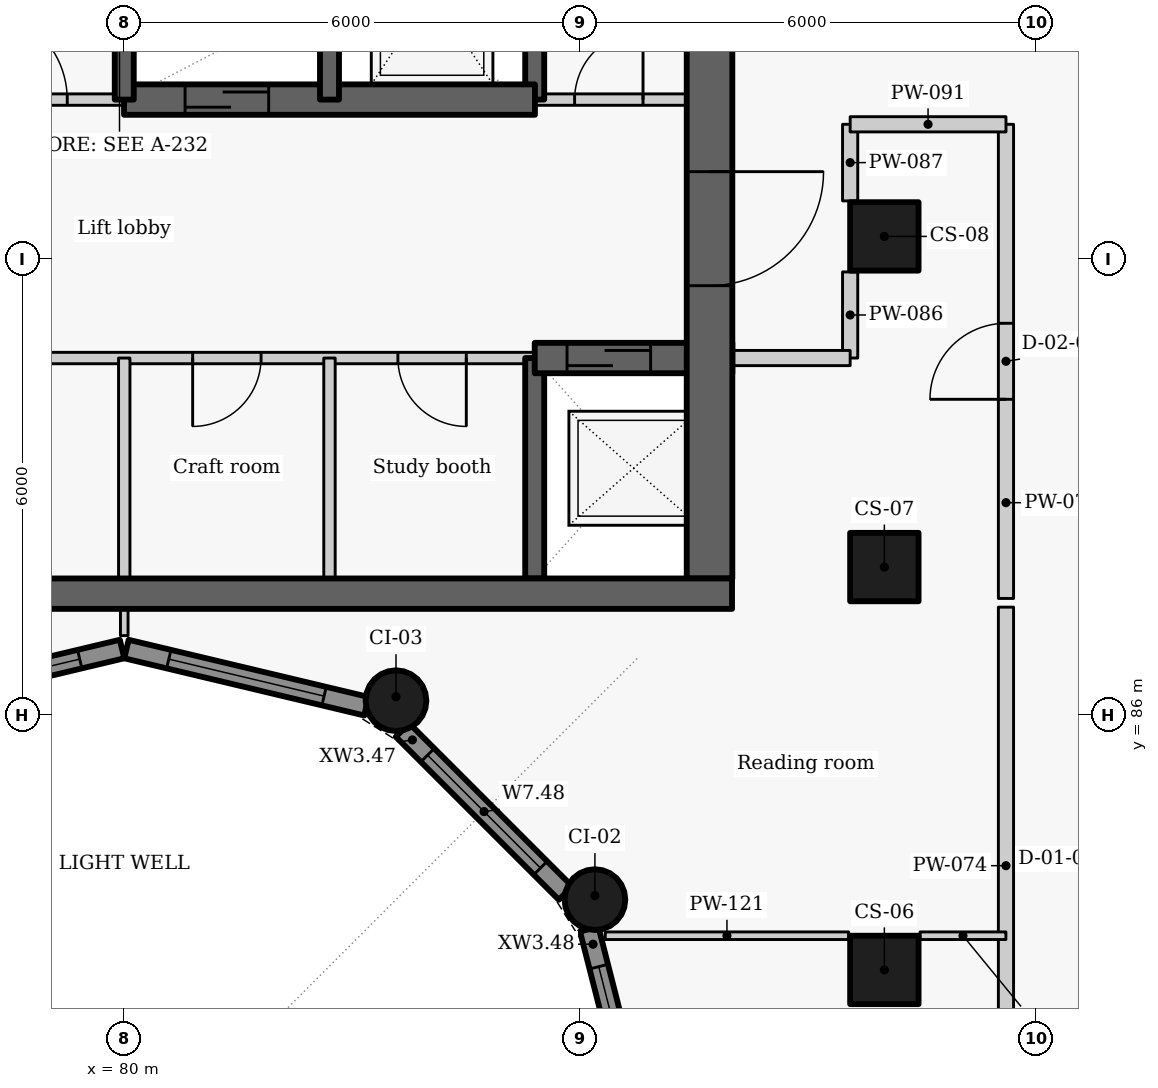
"""IFC4 building model, lengths in metres.
Left out: names, types, materials, properties, quantities, classifications, styles, units other than length and angle.
Written with IfcOpenShell. Run it as: python <this file> out.ifc"""

import sys

from ifc_helpers import new_model, si_unit, direction, frame, frame_2d, origin, origin_2d, place, context, subcontext, project, spatial, rectangle, circle, extrude, element, fill, save


model = new_model("IFC4")
c1 = context("Model", 3, precision=1e-05, world=origin(), true_north=direction((0.0, 1.0)))
c2 = subcontext(c1, "Body", "Model", "MODEL_VIEW")
j1 = project(units=[si_unit("LENGTHUNIT", "METRE"), si_unit("PLANEANGLEUNIT", "RADIAN")], contexts=[c1])
p1 = place(None, origin())
s1 = spatial("IfcSite", under=j1, at=p1, CompositionType="ELEMENT")
p2 = place(p1, origin())
s2 = spatial("IfcBuilding", under=s1, at=p2, CompositionType="ELEMENT")
p3 = place(p2, frame((0.0, 0.0, 180.0)))
s3 = spatial("IfcBuildingStorey", under=s2, at=p3, CompositionType="ELEMENT", Elevation=180.0)
for number, where, z_axis, x_axis in (
    (1, (90.0, 82.65, 0.0), (0.0, 0.0, 1.0), (0.0, 1.0, 0.0)),
    (2, (90.0, 87.95, 0.0), (0.0, 0.0, 1.0), (0.0, 1.0, 0.0)),
    (3, (90.0, 92.3, 0.0), (0.0, 0.0, 1.0), (0.0, 1.0, 0.0)),
):
    element("IfcColumn", number, at=place(p3, frame(where, z_axis=z_axis, x_axis=x_axis)), inside=s3, PredefinedType="COLUMN", context=c2, shape_type="SweptSolid", body=[
        extrude(rectangle(XDim=0.9, YDim=0.9, at=origin_2d()), origin(), (0.0, 0.0, 1.0), 3.3),
    ])
for number, where, z_axis, x_axis in (
    (4, (86.192, 83.575, 0.0), (0.0, 0.0, 1.0), (-0.5, 0.866, 0.0)),
    (5, (83.575, 86.192, 0.0), (0.0, 0.0, 1.0), (-0.866, 0.5, 0.0)),
):
    element("IfcColumn", number, at=place(p3, frame(where, z_axis=z_axis, x_axis=x_axis)), inside=s3, PredefinedType="COLUMN", context=c2, shape_type="SweptSolid", body=[
        extrude(circle(Radius=0.4, at=origin_2d()), origin(), (0.0, 0.0, 1.0), 3.3),
    ])
p4 = place(p3, frame((76.814, 86.119, 0.0), z_axis=(0.0, 0.0, 1.0), x_axis=(0.972773113459, 0.231759508395, 0.0)))
e6 = element("IfcWall", 6, at=p4, inside=s3, PredefinedType="SOLIDWALL", context=c2, shape_type="SweptSolid", body=[
    extrude(rectangle(XDim=3.246, YDim=0.25, at=frame_2d((1.623, 0.0))), origin(), (0.0, 0.0, 1.0), 2.425),
])
p5 = place(p4, frame((0.573, 0.0, 0.9)))
e7 = element("IfcOpeningElement", 7, at=p5, cuts=e6, PredefinedType="OPENING", context=c2, shape_type="SweptSolid", body=[
    extrude(rectangle(XDim=2.1, YDim=1.1, at=frame_2d((1.05, 0.55))), frame((0.0, 0.135, 0.0), z_axis=(0.0, -1.0, 0.0), x_axis=(1.0, 0.0, 0.0)), (0.0, 0.0, 1.0), 0.27),
])
p6 = place(p3, frame((80.029, 86.872, 0.0), z_axis=(0.0, 0.0, 1.0), x_axis=(0.972773113459, -0.231759508395, 0.0)))
e8 = element("IfcWall", 8, at=p6, inside=s3, PredefinedType="SOLIDWALL", context=c2, shape_type="SweptSolid", body=[
    extrude(rectangle(XDim=3.246, YDim=0.25, at=frame_2d((1.623, 0.0))), origin(), (0.0, 0.0, 1.0), 2.425),
])
p7 = place(p6, frame((0.573, 0.0, 0.9)))
e9 = element("IfcOpeningElement", 9, at=p7, cuts=e8, PredefinedType="OPENING", context=c2, shape_type="SweptSolid", body=[
    extrude(rectangle(XDim=2.1, YDim=1.1, at=frame_2d((1.05, 0.55))), frame((0.0, 0.135, 0.0), z_axis=(0.0, -1.0, 0.0), x_axis=(1.0, 0.0, 0.0)), (0.0, 0.0, 1.0), 0.27),
])
p8 = place(p3, frame((83.661, 85.806, 0.0), z_axis=(0.0, 0.0, 1.0), x_axis=(0.707106781187, -0.707106781187, 0.0)))
e10 = element("IfcWall", 10, at=p8, inside=s3, PredefinedType="SOLIDWALL", context=c2, shape_type="SweptSolid", body=[
    extrude(rectangle(XDim=3.033, YDim=0.25, at=frame_2d((1.517, 0.0))), origin(), (0.0, 0.0, 1.0), 2.425),
])
p9 = place(p8, frame((0.467, 0.0, 0.9)))
e11 = element("IfcOpeningElement", 11, at=p9, cuts=e10, PredefinedType="OPENING", context=c2, shape_type="SweptSolid", body=[
    extrude(rectangle(XDim=2.1, YDim=1.1, at=frame_2d((1.05, 0.55))), frame((0.0, 0.135, 0.0), z_axis=(0.0, -1.0, 0.0), x_axis=(1.0, 0.0, 0.0)), (0.0, 0.0, 1.0), 0.27),
])
p10 = place(p3, frame((86.117, 83.187, 0.0), z_axis=(0.0, 0.0, 1.0), x_axis=(0.247055971283, -0.969001211069, 0.0)))
e12 = element("IfcWall", 12, at=p10, inside=s3, PredefinedType="SOLIDWALL", context=c2, shape_type="SweptSolid", body=[
    extrude(rectangle(XDim=3.01, YDim=0.25, at=frame_2d((1.505, 0.0))), origin(), (0.0, 0.0, 1.0), 2.425),
])
p11 = place(p10, frame((0.51, 0.0, 0.9)))
e13 = element("IfcOpeningElement", 13, at=p11, cuts=e12, PredefinedType="OPENING", context=c2, shape_type="SweptSolid", body=[
    extrude(rectangle(XDim=2.1, YDim=1.1, at=frame_2d((1.05, 0.55))), frame((0.0, 0.135, 0.0), z_axis=(0.0, -1.0, 0.0), x_axis=(1.0, 0.0, 0.0)), (0.0, 0.0, 1.0), 0.27),
])
p12 = place(p3, frame((85.4, 90.7, 0.0), z_axis=(0.0, 0.0, 1.0), x_axis=(-1.0, 0.0, 0.0)))
e14 = element("IfcWall", 14, at=p12, inside=s3, PredefinedType="PARTITIONING", context=c2, shape_type="SweptSolid", body=[
    extrude(rectangle(XDim=13.4, YDim=0.15, at=frame_2d((6.7, 0.0))), origin(), (0.0, 0.0, 1.0), 3.025),
])
p13 = place(p12, frame((11.325, 0.0, 0.0)))
e15 = element("IfcOpeningElement", 15, at=p13, cuts=e14, PredefinedType="OPENING", context=c2, shape_type="SweptSolid", body=[
    extrude(rectangle(XDim=0.9, YDim=2.1, at=frame_2d((0.45, 1.05))), frame((0.0, 0.085, 0.0), z_axis=(0.0, -1.0, 0.0), x_axis=(1.0, 0.0, 0.0)), (0.0, 0.0, 1.0), 0.17),
])
p14 = place(p12, frame((7.65, 0.0, 0.0)))
e16 = element("IfcOpeningElement", 16, at=p14, cuts=e14, PredefinedType="OPENING", context=c2, shape_type="SweptSolid", body=[
    extrude(rectangle(XDim=0.9, YDim=2.1, at=frame_2d((0.45, 1.05))), frame((0.0, 0.085, 0.0), z_axis=(0.0, -1.0, 0.0), x_axis=(1.0, 0.0, 0.0)), (0.0, 0.0, 1.0), 0.17),
])
p15 = place(p12, frame((3.6, 0.0, 0.0)))
e17 = element("IfcOpeningElement", 17, at=p15, cuts=e14, PredefinedType="OPENING", context=c2, shape_type="SweptSolid", body=[
    extrude(rectangle(XDim=0.9, YDim=2.1, at=frame_2d((0.45, 1.05))), frame((0.0, 0.085, 0.0), z_axis=(0.0, -1.0, 0.0), x_axis=(1.0, 0.0, 0.0)), (0.0, 0.0, 1.0), 0.17),
])
p16 = place(p12, frame((0.9, 0.0, 0.0)))
e18 = element("IfcOpeningElement", 18, at=p16, cuts=e14, PredefinedType="OPENING", context=c2, shape_type="SweptSolid", body=[
    extrude(rectangle(XDim=0.9, YDim=2.1, at=frame_2d((0.45, 1.05))), frame((0.0, 0.085, 0.0), z_axis=(0.0, -1.0, 0.0), x_axis=(1.0, 0.0, 0.0)), (0.0, 0.0, 1.0), 0.17),
])
p17 = place(p3, frame((85.4, 87.8, -0.275), z_axis=(0.0, 0.0, 1.0), x_axis=(0.0, 1.0, 0.0)))
e19 = element("IfcWall", 19, at=p17, inside=s3, PredefinedType="SHEAR", context=c2, shape_type="SweptSolid", body=[
    extrude(rectangle(XDim=2.9, YDim=0.25, at=frame_2d((1.45, 0.0))), origin(), (0.0, 0.0, 1.0), 3.3),
])
p18 = place(p3, frame((85.4, 94.1, -0.275), z_axis=(0.0, 0.0, 1.0), x_axis=(0.0, 1.0, 0.0)))
e20 = element("IfcWall", 20, at=p18, inside=s3, PredefinedType="SHEAR", context=c2, shape_type="SweptSolid", body=[
    extrude(rectangle(XDim=2.8, YDim=0.25, at=frame_2d((1.4, 0.0))), origin(), (0.0, 0.0, 1.0), 3.3),
])
p19 = place(p3, frame((85.4, 90.7, -0.275), z_axis=(0.0, 0.0, 1.0), x_axis=(1.0, 0.0, 0.0)))
e21 = element("IfcWall", 21, at=p19, inside=s3, PredefinedType="SHEAR", context=c2, shape_type="SweptSolid", body=[
    extrude(rectangle(XDim=2.6, YDim=0.4, at=frame_2d((1.3, 0.0))), origin(), (0.0, 0.0, 1.0), 3.3),
])
p20 = place(p19, frame((0.425, 0.0, 0.275)))
e22 = element("IfcOpeningElement", 22, at=p20, cuts=e21, PredefinedType="OPENING", context=c2, shape_type="SweptSolid", body=[
    extrude(rectangle(XDim=1.1, YDim=2.1, at=frame_2d((0.55, 1.05))), frame((0.0, 0.21, 0.0), z_axis=(0.0, -1.0, 0.0), x_axis=(1.0, 0.0, 0.0)), (0.0, 0.0, 1.0), 0.42),
])
p21 = place(p3, frame((87.7, 102.05, -0.275), z_axis=(0.0, 0.0, 1.0), x_axis=(0.0, -1.0, 0.0)))
e23 = element("IfcWall", 23, at=p21, inside=s3, PredefinedType="SHEAR", context=c2, shape_type="SweptSolid", body=[
    extrude(rectangle(XDim=14.25, YDim=0.6, at=frame_2d((7.125, 0.0))), origin(), (0.0, 0.0, 1.0), 3.3),
])
p22 = place(p21, frame((8.898, 0.0, 0.275)))
e24 = element("IfcOpeningElement", 24, at=p22, cuts=e23, PredefinedType="OPENING", context=c2, shape_type="SweptSolid", body=[
    extrude(rectangle(XDim=1.5, YDim=2.1, at=frame_2d((0.75, 1.05))), frame((0.0, 0.31, 0.0), z_axis=(0.0, -1.0, 0.0), x_axis=(1.0, 0.0, 0.0)), (0.0, 0.0, 1.0), 0.62),
])
for number, where, z_axis, x_axis in (
    (25, (80.0, 87.8, 0.0), (0.0, 0.0, 1.0), (0.0, 1.0, 0.0)),
    (26, (82.7, 87.8, 0.0), (0.0, 0.0, 1.0), (0.0, 1.0, 0.0)),
):
    element("IfcWall", number, at=place(p3, frame(where, z_axis=z_axis, x_axis=x_axis)), inside=s3, PredefinedType="PARTITIONING", context=c2, shape_type="SweptSolid", body=[
        extrude(rectangle(XDim=2.9, YDim=0.15, at=frame_2d((1.45, 0.0))), origin(), (0.0, 0.0, 1.0), 3.025),
    ])
p23 = place(p3, frame((77.297, 94.1, 0.0), z_axis=(0.0, 0.0, 1.0), x_axis=(1.0, 0.0, 0.0)))
e27 = element("IfcWall", 27, at=p23, inside=s3, PredefinedType="PARTITIONING", context=c2, shape_type="SweptSolid", body=[
    extrude(rectangle(XDim=2.706, YDim=0.15, at=frame_2d((1.353, 0.0))), origin(), (0.0, 0.0, 1.0), 3.025),
])
p24 = place(p23, frame((0.753, 0.0, 0.0)))
e28 = element("IfcOpeningElement", 28, at=p24, cuts=e27, PredefinedType="OPENING", context=c2, shape_type="SweptSolid", body=[
    extrude(rectangle(XDim=1.2, YDim=2.1, at=frame_2d((0.6, 1.05))), frame((0.0, 0.085, 0.0), z_axis=(0.0, -1.0, 0.0), x_axis=(1.0, 0.0, 0.0)), (0.0, 0.0, 1.0), 0.17),
])
p25 = place(p3, frame((85.397, 94.1, 0.0), z_axis=(0.0, 0.0, 1.0), x_axis=(1.0, 0.0, 0.0)))
e29 = element("IfcWall", 29, at=p25, inside=s3, PredefinedType="PARTITIONING", context=c2, shape_type="SweptSolid", body=[
    extrude(rectangle(XDim=2.603, YDim=0.15, at=frame_2d((1.302, 0.0))), origin(), (0.0, 0.0, 1.0), 3.025),
])
p26 = place(p25, frame((0.528, 0.0, 0.0)))
e30 = element("IfcOpeningElement", 30, at=p26, cuts=e29, PredefinedType="OPENING", context=c2, shape_type="SweptSolid", body=[
    extrude(rectangle(XDim=0.9, YDim=2.1, at=frame_2d((0.45, 1.05))), frame((0.0, 0.085, 0.0), z_axis=(0.0, -1.0, 0.0), x_axis=(1.0, 0.0, 0.0)), (0.0, 0.0, 1.0), 0.17),
])
p27 = place(p3, frame((79.997, 94.1, -0.275), z_axis=(0.0, 0.0, 1.0), x_axis=(1.0, 0.0, 0.0)))
e31 = element("IfcWall", 31, at=p27, inside=s3, PredefinedType="SHEAR", context=c2, shape_type="SweptSolid", body=[
    extrude(rectangle(XDim=5.406, YDim=0.4, at=frame_2d((2.703, 0.0))), origin(), (0.0, 0.0, 1.0), 3.3),
])
p28 = place(p27, frame((0.803, 0.0, 0.275)))
e32 = element("IfcOpeningElement", 32, at=p28, cuts=e31, PredefinedType="OPENING", context=c2, shape_type="SweptSolid", body=[
    extrude(rectangle(XDim=1.1, YDim=2.1, at=frame_2d((0.55, 1.05))), frame((0.0, 0.21, 0.0), z_axis=(0.0, -1.0, 0.0), x_axis=(1.0, 0.0, 0.0)), (0.0, 0.0, 1.0), 0.42),
])
for number, where, z_axis, x_axis in (
    (33, (80.0, 94.1, -0.275), (0.0, 0.0, 1.0), (0.0, 1.0, 0.0)),
    (34, (82.7, 94.1, -0.275), (0.0, 0.0, 1.0), (0.0, 1.0, 0.0)),
):
    element("IfcWall", number, at=place(p3, frame(where, z_axis=z_axis, x_axis=x_axis)), inside=s3, PredefinedType="SHEAR", context=c2, shape_type="SweptSolid", body=[
        extrude(rectangle(XDim=2.8, YDim=0.25, at=frame_2d((1.4, 0.0))), origin(), (0.0, 0.0, 1.0), 3.3),
    ])
p29 = place(p3, frame((91.6, 76.937, 0.0), z_axis=(0.0, 0.0, 1.0), x_axis=(0.0, 1.0, 0.0)))
e35 = element("IfcWall", 35, at=p29, inside=s3, PredefinedType="PARTITIONING", context=c2, shape_type="SweptSolid", body=[
    extrude(rectangle(XDim=10.486, YDim=0.2, at=frame_2d((5.243, 0.0))), origin(), (0.0, 0.0, 1.0), 3.025),
])
p30 = place(p29, frame((2.583, 0.0, 0.0)))
e36 = element("IfcOpeningElement", 36, at=p30, cuts=e35, PredefinedType="OPENING", context=c2, shape_type="SweptSolid", body=[
    extrude(rectangle(XDim=1.0, YDim=2.1, at=frame_2d((0.5, 1.05))), frame((0.0, 0.11, 0.0), z_axis=(0.0, -1.0, 0.0), x_axis=(1.0, 0.0, 0.0)), (0.0, 0.0, 1.0), 0.22),
])
p31 = place(p3, frame((91.6, 87.537, 0.0), z_axis=(0.0, 0.0, 1.0), x_axis=(0.0, 1.0, 0.0)))
e37 = element("IfcWall", 37, at=p31, inside=s3, PredefinedType="PARTITIONING", context=c2, shape_type="SweptSolid", body=[
    extrude(rectangle(XDim=6.238, YDim=0.2, at=frame_2d((3.119, 0.0))), origin(), (0.0, 0.0, 1.0), 3.025),
])
p32 = place(p31, frame((2.62, 0.0, 0.0)))
e38 = element("IfcOpeningElement", 38, at=p32, cuts=e37, PredefinedType="OPENING", context=c2, shape_type="SweptSolid", body=[
    extrude(rectangle(XDim=1.0, YDim=2.1, at=frame_2d((0.5, 1.05))), frame((0.0, 0.11, 0.0), z_axis=(0.0, -1.0, 0.0), x_axis=(1.0, 0.0, 0.0)), (0.0, 0.0, 1.0), 0.22),
])
p33 = place(p3, frame((89.55, 90.7, 0.0), z_axis=(0.0, 0.0, 1.0), x_axis=(0.0, 1.0, 0.0)))
e39 = element("IfcWall", 39, at=p33, inside=s3, PredefinedType="PARTITIONING", context=c2, shape_type="SweptSolid", body=[
    extrude(rectangle(XDim=1.133, YDim=0.2, at=frame_2d((0.566, 0.0))), origin(), (0.0, 0.0, 1.0), 3.025),
])
p34 = place(p3, frame((89.55, 92.767, 0.0), z_axis=(0.0, 0.0, 1.0), x_axis=(0.0, 1.0, 0.0)))
e40 = element("IfcWall", 40, at=p34, inside=s3, PredefinedType="PARTITIONING", context=c2, shape_type="SweptSolid", body=[
    extrude(rectangle(XDim=1.008, YDim=0.2, at=frame_2d((0.504, 0.0))), origin(), (0.0, 0.0, 1.0), 3.025),
])
p35 = place(p3, frame((89.55, 93.775, 0.0), z_axis=(0.0, 0.0, 1.0), x_axis=(1.0, 0.0, 0.0)))
e41 = element("IfcWall", 41, at=p35, inside=s3, PredefinedType="PARTITIONING", context=c2, shape_type="SweptSolid", body=[
    extrude(rectangle(XDim=2.05, YDim=0.2, at=frame_2d((1.025, 0.0))), origin(), (0.0, 0.0, 1.0), 2.505),
])
p36 = place(p3, frame((88.0, 90.7, 0.0), z_axis=(0.0, 0.0, 1.0), x_axis=(1.0, 0.0, 0.0)))
e42 = element("IfcWall", 42, at=p36, inside=s3, PredefinedType="PARTITIONING", context=c2, shape_type="SweptSolid", body=[
    extrude(rectangle(XDim=1.55, YDim=0.2, at=frame_2d((0.775, 0.0))), origin(), (0.0, 0.0, 1.0), 3.025),
])
p37 = place(p3, frame((80.0, 87.048, 0.0), z_axis=(0.0, 0.0, 1.0), x_axis=(0.0, 1.0, 0.0)))
e43 = element("IfcWall", 43, at=p37, inside=s3, PredefinedType="PARTITIONING", context=c2, shape_type="SweptSolid", body=[
    extrude(rectangle(XDim=0.352, YDim=0.1, at=frame_2d((0.176, 0.0))), origin(), (0.0, 0.0, 1.0), 3.025),
])
p38 = place(p3, frame((86.328, 83.1, 0.0), z_axis=(0.0, 0.0, 1.0), x_axis=(1.0, 0.0, 0.0)))
e44 = element("IfcWall", 44, at=p38, inside=s3, PredefinedType="PARTITIONING", context=c2, shape_type="SweptSolid", body=[
    extrude(rectangle(XDim=3.202, YDim=0.1, at=frame_2d((1.601, 0.0))), origin(), (0.0, 0.0, 1.0), 3.025),
])
p39 = place(p3, frame((90.47, 83.1, 0.0), z_axis=(0.0, 0.0, 1.0), x_axis=(1.0, 0.0, 0.0)))
e45 = element("IfcWall", 45, at=p39, inside=s3, PredefinedType="PARTITIONING", context=c2, shape_type="SweptSolid", body=[
    extrude(rectangle(XDim=1.129, YDim=0.1, at=frame_2d((0.564, 0.0))), origin(), (0.0, 0.0, 1.0), 3.025),
])
p40 = place(p3, frame((72.004, 87.6, -0.275), z_axis=(0.0, 0.0, 1.0), x_axis=(1.0, 0.0, 0.0)))
e46 = element("IfcWall", 46, at=p40, inside=s3, PredefinedType="SHEAR", context=c2, shape_type="SweptSolid", body=[
    extrude(rectangle(XDim=15.992, YDim=0.4, at=frame_2d((7.996, 0.0))), origin(), (0.0, 0.0, 1.0), 3.3),
])
p41 = place(p5, origin())
e47 = element("IfcWindow", 47, at=p41, inside=s3, PartitioningType="SINGLE_PANEL", PredefinedType="WINDOW", context=c2, shape_type="SweptSolid", body=[
    extrude(rectangle(XDim=2.1, YDim=1.1, at=frame_2d((1.05, 0.55))), frame((0.0, 0.03, 0.0), z_axis=(0.0, -1.0, 0.0), x_axis=(1.0, 0.0, 0.0)), (0.0, 0.0, 1.0), 0.06),
])
fill(e7, e47)
p42 = place(p7, origin())
e48 = element("IfcWindow", 48, at=p42, inside=s3, PartitioningType="SINGLE_PANEL", PredefinedType="WINDOW", context=c2, shape_type="SweptSolid", body=[
    extrude(rectangle(XDim=2.1, YDim=1.1, at=frame_2d((1.05, 0.55))), frame((0.0, 0.03, 0.0), z_axis=(0.0, -1.0, 0.0), x_axis=(1.0, 0.0, 0.0)), (0.0, 0.0, 1.0), 0.06),
])
fill(e9, e48)
p43 = place(p9, origin())
e49 = element("IfcWindow", 49, at=p43, inside=s3, PartitioningType="SINGLE_PANEL", PredefinedType="WINDOW", context=c2, shape_type="SweptSolid", body=[
    extrude(rectangle(XDim=2.1, YDim=1.1, at=frame_2d((1.05, 0.55))), frame((0.0, 0.03, 0.0), z_axis=(0.0, -1.0, 0.0), x_axis=(1.0, 0.0, 0.0)), (0.0, 0.0, 1.0), 0.06),
])
fill(e11, e49)
p44 = place(p11, origin())
e50 = element("IfcWindow", 50, at=p44, inside=s3, PartitioningType="SINGLE_PANEL", PredefinedType="WINDOW", context=c2, shape_type="SweptSolid", body=[
    extrude(rectangle(XDim=2.1, YDim=1.1, at=frame_2d((1.05, 0.55))), frame((0.0, 0.03, 0.0), z_axis=(0.0, -1.0, 0.0), x_axis=(1.0, 0.0, 0.0)), (0.0, 0.0, 1.0), 0.06),
])
fill(e13, e50)
p45 = place(p20, origin())
e51 = element("IfcDoor", 51, at=p45, inside=s3, OperationType="SLIDING_TO_LEFT", PredefinedType="DOOR", context=c2, shape_type="SweptSolid", body=[
    extrude(rectangle(XDim=1.1, YDim=2.1, at=frame_2d((0.55, 1.05))), frame((0.0, 0.025, 0.0), z_axis=(0.0, -1.0, 0.0), x_axis=(1.0, 0.0, 0.0)), (0.0, 0.0, 1.0), 0.05),
])
fill(e22, e51)
p46 = place(p15, origin())
e52 = element("IfcDoor", 52, at=p46, inside=s3, OperationType="SINGLE_SWING_RIGHT", PredefinedType="DOOR", context=c2, shape_type="SweptSolid", body=[
    extrude(rectangle(XDim=0.9, YDim=2.1, at=frame_2d((0.45, 1.05))), frame((0.0, 0.025, 0.0), z_axis=(0.0, -1.0, 0.0), x_axis=(1.0, 0.0, 0.0)), (0.0, 0.0, 1.0), 0.05),
])
fill(e17, e52)
p47 = place(p16, origin())
e53 = element("IfcDoor", 53, at=p47, inside=s3, OperationType="SINGLE_SWING_LEFT", PredefinedType="DOOR", context=c2, shape_type="SweptSolid", body=[
    extrude(rectangle(XDim=0.9, YDim=2.1, at=frame_2d((0.45, 1.05))), frame((0.0, 0.025, 0.0), z_axis=(0.0, -1.0, 0.0), x_axis=(1.0, 0.0, 0.0)), (0.0, 0.0, 1.0), 0.05),
])
fill(e18, e53)
p48 = place(p24, origin())
e54 = element("IfcDoor", 54, at=p48, inside=s3, OperationType="DOUBLE_DOOR_SINGLE_SWING", PredefinedType="DOOR", context=c2, shape_type="SweptSolid", body=[
    extrude(rectangle(XDim=1.2, YDim=2.1, at=frame_2d((0.6, 1.05))), frame((0.0, 0.025, 0.0), z_axis=(0.0, -1.0, 0.0), x_axis=(1.0, 0.0, 0.0)), (0.0, 0.0, 1.0), 0.05),
])
fill(e28, e54)
p49 = place(p28, origin())
e55 = element("IfcDoor", 55, at=p49, inside=s3, OperationType="SLIDING_TO_LEFT", PredefinedType="DOOR", context=c2, shape_type="SweptSolid", body=[
    extrude(rectangle(XDim=1.1, YDim=2.1, at=frame_2d((0.55, 1.05))), frame((0.0, 0.025, 0.0), z_axis=(0.0, -1.0, 0.0), x_axis=(1.0, 0.0, 0.0)), (0.0, 0.0, 1.0), 0.05),
])
fill(e32, e55)
p50 = place(p26, origin())
e56 = element("IfcDoor", 56, at=p50, inside=s3, OperationType="SINGLE_SWING_RIGHT", PredefinedType="DOOR", context=c2, shape_type="SweptSolid", body=[
    extrude(rectangle(XDim=0.9, YDim=2.1, at=frame_2d((0.45, 1.05))), frame((0.0, 0.025, 0.0), z_axis=(0.0, -1.0, 0.0), x_axis=(1.0, 0.0, 0.0)), (0.0, 0.0, 1.0), 0.05),
])
fill(e30, e56)
p51 = place(p32, origin())
e57 = element("IfcDoor", 57, at=p51, inside=s3, OperationType="SINGLE_SWING_LEFT", PredefinedType="DOOR", context=c2, shape_type="SweptSolid", body=[
    extrude(rectangle(XDim=1.0, YDim=2.1, at=frame_2d((0.5, 1.05))), frame((0.0, 0.025, 0.0), z_axis=(0.0, -1.0, 0.0), x_axis=(1.0, 0.0, 0.0)), (0.0, 0.0, 1.0), 0.05),
])
fill(e38, e57)
p52 = place(p22, origin())
e58 = element("IfcDoor", 58, at=p52, inside=s3, OperationType="DOUBLE_DOOR_SINGLE_SWING", PredefinedType="DOOR", context=c2, shape_type="SweptSolid", body=[
    extrude(rectangle(XDim=1.5, YDim=2.1, at=frame_2d((0.75, 1.05))), frame((0.0, 0.025, 0.0), z_axis=(0.0, -1.0, 0.0), x_axis=(1.0, 0.0, 0.0)), (0.0, 0.0, 1.0), 0.05),
])
fill(e24, e58)
save(model, sys.argv[1])
